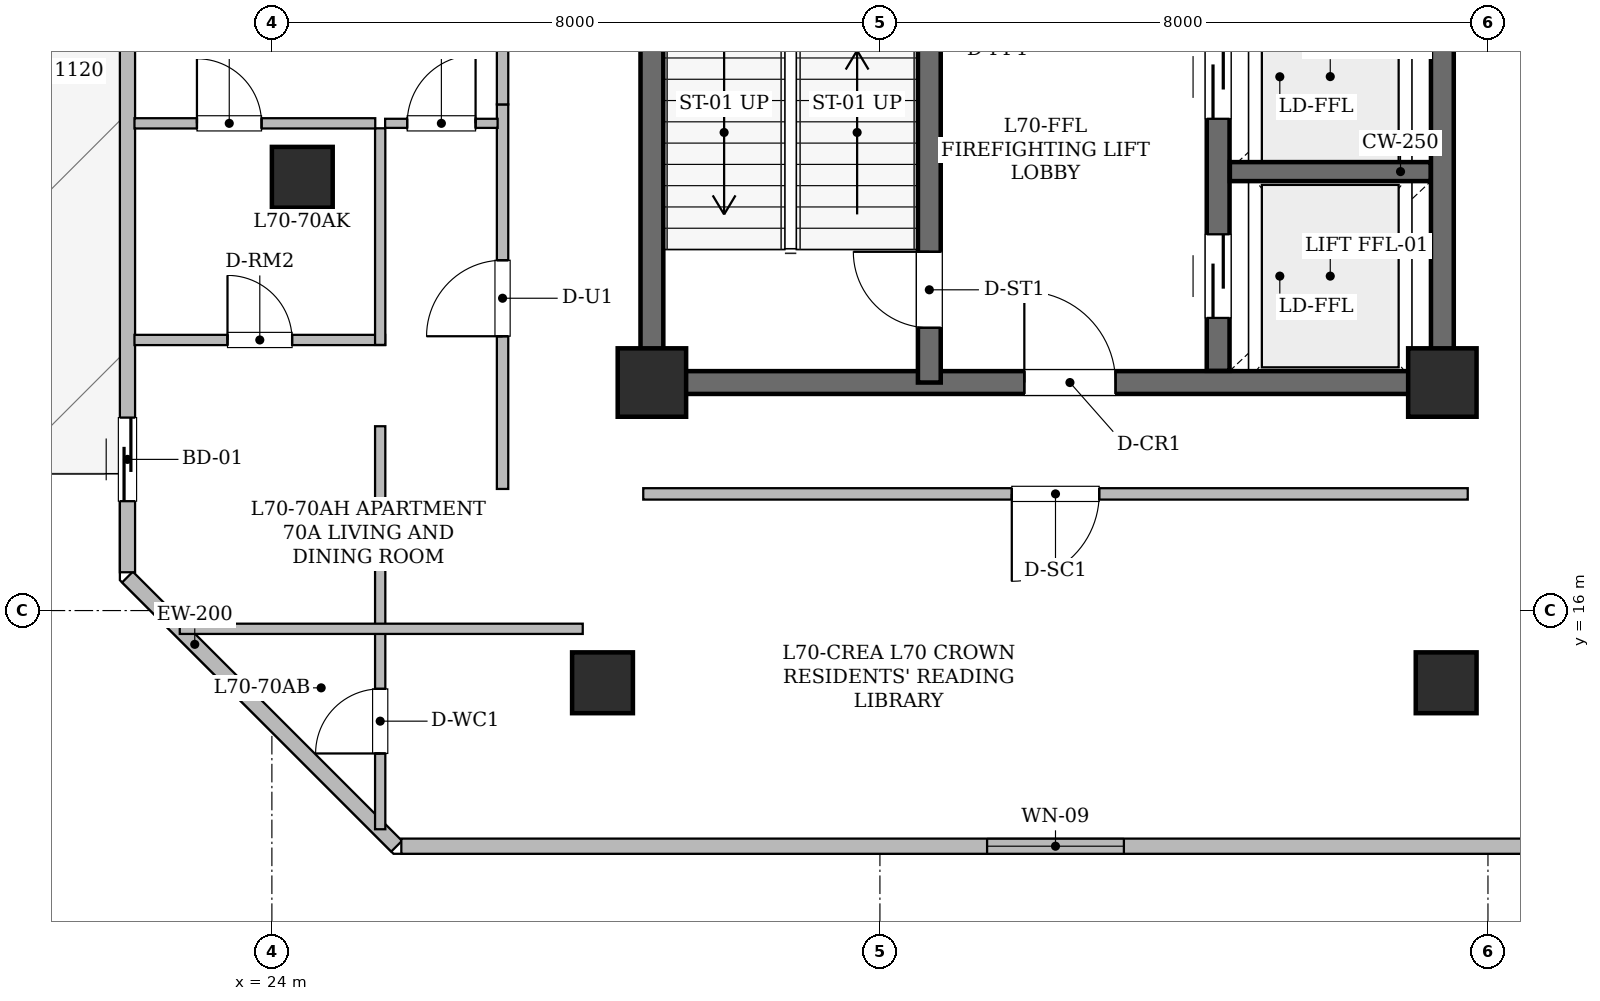
"""IFC4 building model, lengths in metres.
Left out: names, types, materials, properties, quantities, classifications, styles, units other than length and angle.
Written with IfcOpenShell. Run it as: python <this file> out.ifc"""

import sys

from ifc_helpers import new_model, si_unit, direction, frame, frame_2d, origin, origin_2d, place, context, subcontext, project, spatial, rectangle, hollow_rectangle, extrude, element, fill, save


model = new_model("IFC4")
c1 = context("Model", 3, precision=1e-05, world=origin(), true_north=direction((0.0, 1.0)))
c2 = subcontext(c1, "Body", "Model", "MODEL_VIEW")
j1 = project(units=[si_unit("LENGTHUNIT", "METRE"), si_unit("PLANEANGLEUNIT", "RADIAN")], contexts=[c1])
p1 = place(None, origin())
s1 = spatial("IfcSite", under=j1, at=p1, CompositionType="ELEMENT")
p2 = place(p1, origin())
s2 = spatial("IfcBuilding", under=s1, at=p2, CompositionType="ELEMENT")
p3 = place(p2, frame((0.0, 0.0, 273.65)))
s3 = spatial("IfcBuildingStorey", under=s2, at=p3, CompositionType="ELEMENT", Elevation=273.65)
for number, where, z_axis, x_axis in (
    (1, (29.0, 19.0, 0.0), (0.0, 0.0, 1.0), (1.0, 0.0, 0.0)),
    (2, (39.4, 19.0, 0.0), (0.0, 0.0, 1.0), (1.0, 0.0, 0.0)),
):
    element("IfcColumn", number, at=place(p3, frame(where, z_axis=z_axis, x_axis=x_axis)), inside=s3, PredefinedType="COLUMN", context=c2, shape_type="SweptSolid", body=[
        extrude(hollow_rectangle(XDim=0.9, YDim=0.9, WallThickness=0.045, at=origin_2d()), origin(), (0.0, 0.0, 1.0), 4.2),
    ])
for number, where, z_axis, x_axis in (
    (3, (28.35, 15.05, 0.0), (0.0, 0.0, 1.0), (1.0, 0.0, 0.0)),
    (4, (39.45, 15.05, 0.0), (0.0, 0.0, 1.0), (1.0, 0.0, 0.0)),
    (5, (24.4, 21.7, 0.0), (0.0, 0.0, 1.0), (1.0, 0.0, 0.0)),
):
    element("IfcColumn", number, at=place(p3, frame(where, z_axis=z_axis, x_axis=x_axis)), inside=s3, PredefinedType="COLUMN", context=c2, shape_type="SweptSolid", body=[
        extrude(hollow_rectangle(XDim=0.8, YDim=0.8, WallThickness=0.04, at=origin_2d()), origin(), (0.0, 0.0, 1.0), 4.175),
    ])
p4 = place(p3, frame((25.641, 12.9, 0.0), z_axis=(0.0, 0.0, 1.0), x_axis=(-0.707106781187, 0.707106781187, 0.0)))
e6 = element("IfcWall", 6, at=p4, inside=s3, PredefinedType="STANDARD", context=c2, shape_type="SweptSolid", body=[
    extrude(rectangle(XDim=5.008, YDim=0.2, at=frame_2d((2.504, 0.0))), origin(), (0.0, 0.0, 1.0), 3.78),
])
p5 = place(p3, frame((22.1, 16.504, 0.0), z_axis=(0.0, 0.0, 1.0), x_axis=(0.0, 1.0, 0.0)))
e7 = element("IfcWall", 7, at=p5, inside=s3, PredefinedType="STANDARD", context=c2, shape_type="SweptSolid", body=[
    extrude(rectangle(XDim=8.664, YDim=0.2, at=frame_2d((4.332, 0.0))), origin(), (0.0, 0.0, 1.0), 3.78),
])
p6 = place(p5, frame((0.935, 0.0, 0.0)))
e8 = element("IfcOpeningElement", 8, at=p6, cuts=e7, PredefinedType="OPENING", context=c2, shape_type="SweptSolid", body=[
    extrude(rectangle(XDim=1.1, YDim=2.2, at=frame_2d((0.55, 1.1))), frame((0.0, 0.11, 0.0), z_axis=(0.0, -1.0, 0.0), x_axis=(1.0, 0.0, 0.0)), (0.0, 0.0, 1.0), 0.22),
])
p7 = place(p3, frame((64.296, 12.9, 0.0), z_axis=(0.0, 0.0, 1.0), x_axis=(-1.0, 0.0, 0.0)))
e9 = element("IfcWall", 9, at=p7, inside=s3, PredefinedType="STANDARD", context=c2, shape_type="SweptSolid", body=[
    extrude(rectangle(XDim=38.593, YDim=0.2, at=frame_2d((19.296, 0.0))), origin(), (0.0, 0.0, 1.0), 3.78),
])
p8 = place(p7, frame((29.086, 0.0, 0.85)))
e10 = element("IfcOpeningElement", 10, at=p8, cuts=e9, PredefinedType="OPENING", context=c2, shape_type="SweptSolid", body=[
    extrude(rectangle(XDim=1.8, YDim=0.92, at=frame_2d((0.9, 0.46))), frame((0.0, 0.11, 0.0), z_axis=(0.0, -1.0, 0.0), x_axis=(1.0, 0.0, 0.0)), (0.0, 0.0, 1.0), 0.22),
])
p9 = place(p7, frame((18.761, 0.0, 0.78)))
e11 = element("IfcOpeningElement", 11, at=p9, cuts=e9, PredefinedType="OPENING", context=c2, shape_type="SweptSolid", body=[
    extrude(rectangle(XDim=1.2, YDim=1.5, at=frame_2d((0.6, 0.75))), frame((0.0, 0.11, 0.0), z_axis=(0.0, -1.0, 0.0), x_axis=(1.0, 0.0, 0.0)), (0.0, 0.0, 1.0), 0.22),
])
p10 = place(p7, frame((15.286, 0.0, 0.85)))
e12 = element("IfcOpeningElement", 12, at=p10, cuts=e9, PredefinedType="OPENING", context=c2, shape_type="SweptSolid", body=[
    extrude(rectangle(XDim=1.8, YDim=0.92, at=frame_2d((0.9, 0.46))), frame((0.0, 0.11, 0.0), z_axis=(0.0, -1.0, 0.0), x_axis=(1.0, 0.0, 0.0)), (0.0, 0.0, 1.0), 0.22),
])
p11 = place(p7, frame((8.921, 0.0, 0.85)))
e13 = element("IfcOpeningElement", 13, at=p11, cuts=e9, PredefinedType="OPENING", context=c2, shape_type="SweptSolid", body=[
    extrude(rectangle(XDim=1.8, YDim=0.92, at=frame_2d((0.9, 0.46))), frame((0.0, 0.11, 0.0), z_axis=(0.0, -1.0, 0.0), x_axis=(1.0, 0.0, 0.0)), (0.0, 0.0, 1.0), 0.22),
])
p12 = place(p7, frame((1.633, 0.0, 0.85)))
e14 = element("IfcOpeningElement", 14, at=p12, cuts=e9, PredefinedType="OPENING", context=c2, shape_type="SweptSolid", body=[
    extrude(rectangle(XDim=1.8, YDim=0.92, at=frame_2d((0.9, 0.46))), frame((0.0, 0.11, 0.0), z_axis=(0.0, -1.0, 0.0), x_axis=(1.0, 0.0, 0.0)), (0.0, 0.0, 1.0), 0.22),
])
p13 = place(p3, frame((29.0, 19.0, 0.0), z_axis=(0.0, 0.0, 1.0), x_axis=(0.0, 1.0, 0.0)))
e15 = element("IfcWall", 15, at=p13, inside=s3, PredefinedType="SHEAR", context=c2, shape_type="SweptSolid", body=[
    extrude(rectangle(XDim=9.0, YDim=0.3, at=frame_2d((4.5, 0.0))), origin(), (0.0, 0.0, 1.0), 3.78),
])
p14 = place(p3, frame((29.0, 19.0, 0.0), z_axis=(0.0, 0.0, 1.0), x_axis=(1.0, 0.0, 0.0)))
e16 = element("IfcWall", 16, at=p14, inside=s3, PredefinedType="SHEAR", context=c2, shape_type="SweptSolid", body=[
    extrude(rectangle(XDim=10.4, YDim=0.3, at=frame_2d((5.2, 0.0))), origin(), (0.0, 0.0, 1.0), 3.78),
])
p15 = place(p14, frame((4.9, 0.0, 0.0)))
e17 = element("IfcOpeningElement", 17, at=p15, cuts=e16, PredefinedType="OPENING", context=c2, shape_type="SweptSolid", body=[
    extrude(rectangle(XDim=1.2, YDim=2.15, at=frame_2d((0.6, 1.075))), frame((0.0, 0.16, 0.0), z_axis=(0.0, -1.0, 0.0), x_axis=(1.0, 0.0, 0.0)), (0.0, 0.0, 1.0), 0.32),
])
p16 = place(p3, frame((39.4, 19.0, 0.0), z_axis=(0.0, 0.0, 1.0), x_axis=(0.0, 1.0, 0.0)))
e18 = element("IfcWall", 18, at=p16, inside=s3, PredefinedType="SHEAR", context=c2, shape_type="SweptSolid", body=[
    extrude(rectangle(XDim=5.4, YDim=0.3, at=frame_2d((2.7, 0.0))), origin(), (0.0, 0.0, 1.0), 3.78),
])
p17 = place(p3, frame((32.65, 19.0, 0.0), z_axis=(0.0, 0.0, 1.0), x_axis=(0.0, 1.0, 0.0)))
e19 = element("IfcWall", 19, at=p17, inside=s3, PredefinedType="SHEAR", context=c2, shape_type="SweptSolid", body=[
    extrude(rectangle(XDim=9.0, YDim=0.3, at=frame_2d((4.5, 0.0))), origin(), (0.0, 0.0, 1.0), 3.78),
])
p18 = place(p17, frame((0.72, 0.0, 0.0)))
e20 = element("IfcOpeningElement", 20, at=p18, cuts=e19, PredefinedType="OPENING", context=c2, shape_type="SweptSolid", body=[
    extrude(rectangle(XDim=1.0, YDim=2.15, at=frame_2d((0.5, 1.075))), frame((0.0, 0.16, 0.0), z_axis=(0.0, -1.0, 0.0), x_axis=(1.0, 0.0, 0.0)), (0.0, 0.0, 1.0), 0.32),
])
p19 = place(p3, frame((36.45, 19.154, 0.0), z_axis=(0.0, 0.0, 1.0), x_axis=(0.0, 1.0, 0.0)))
e21 = element("IfcWall", 21, at=p19, inside=s3, PredefinedType="SHEAR", context=c2, shape_type="SweptSolid", body=[
    extrude(rectangle(XDim=4.796, YDim=0.3, at=frame_2d((2.398, 0.0))), origin(), (0.0, 0.0, 1.0), 3.78),
])
p20 = place(p19, frame((0.696, 0.0, 0.0)))
e22 = element("IfcOpeningElement", 22, at=p20, cuts=e21, PredefinedType="OPENING", context=c2, shape_type="SweptSolid", body=[
    extrude(rectangle(XDim=1.1, YDim=2.15, at=frame_2d((0.55, 1.075))), frame((0.0, 0.16, 0.0), z_axis=(0.0, -1.0, 0.0), x_axis=(1.0, 0.0, 0.0)), (0.0, 0.0, 1.0), 0.32),
])
p21 = place(p19, frame((3.316, 0.0, 0.0)))
e23 = element("IfcOpeningElement", 23, at=p21, cuts=e21, PredefinedType="OPENING", context=c2, shape_type="SweptSolid", body=[
    extrude(rectangle(XDim=1.1, YDim=2.15, at=frame_2d((0.55, 1.075))), frame((0.0, 0.16, 0.0), z_axis=(0.0, -1.0, 0.0), x_axis=(1.0, 0.0, 0.0)), (0.0, 0.0, 1.0), 0.32),
])
p22 = place(p3, frame((36.604, 21.775, 0.0), z_axis=(0.0, 0.0, 1.0), x_axis=(1.0, 0.0, 0.0)))
e24 = element("IfcWall", 24, at=p22, inside=s3, PredefinedType="SHEAR", context=c2, shape_type="SweptSolid", body=[
    extrude(rectangle(XDim=2.642, YDim=0.25, at=frame_2d((1.321, 0.0))), origin(), (0.0, 0.0, 1.0), 3.78),
])
p23 = place(p3, frame((39.734, 17.535, 0.0), z_axis=(0.0, 0.0, 1.0), x_axis=(-1.0, 0.0, 0.0)))
e25 = element("IfcWall", 25, at=p23, inside=s3, PredefinedType="STANDARD", context=c2, shape_type="SweptSolid", body=[
    extrude(rectangle(XDim=10.848, YDim=0.15, at=frame_2d((5.424, 0.0))), origin(), (0.0, 0.0, 1.0), 2.837),
])
p24 = place(p23, frame((4.849, 0.0, 0.0)))
e26 = element("IfcOpeningElement", 26, at=p24, cuts=e25, PredefinedType="OPENING", context=c2, shape_type="SweptSolid", body=[
    extrude(rectangle(XDim=1.15, YDim=2.2, at=frame_2d((0.575, 1.1))), frame((0.0, 0.085, 0.0), z_axis=(0.0, -1.0, 0.0), x_axis=(1.0, 0.0, 0.0)), (0.0, 0.0, 1.0), 0.17),
])
p25 = place(p3, frame((27.035, 17.6, 0.0), z_axis=(0.0, 0.0, 1.0), x_axis=(0.0, 1.0, 0.0)))
e27 = element("IfcWall", 27, at=p25, inside=s3, PredefinedType="STANDARD", context=c2, shape_type="SweptSolid", body=[
    extrude(rectangle(XDim=5.059, YDim=0.15, at=frame_2d((2.529, 0.0))), origin(), (0.0, 0.0, 1.0), 2.22),
])
p26 = place(p25, frame((2.009, 0.0, 0.0)))
e28 = element("IfcOpeningElement", 28, at=p26, cuts=e27, PredefinedType="OPENING", context=c2, shape_type="SweptSolid", body=[
    extrude(rectangle(XDim=1.0, YDim=2.15, at=frame_2d((0.5, 1.075))), frame((0.0, 0.085, 0.0), z_axis=(0.0, -1.0, 0.0), x_axis=(1.0, 0.0, 0.0)), (0.0, 0.0, 1.0), 0.17),
])
p27 = place(p3, frame((27.035, 22.659, 0.0), z_axis=(0.0, 0.0, 1.0), x_axis=(0.0, 1.0, 0.0)))
e29 = element("IfcWall", 29, at=p27, inside=s3, PredefinedType="STANDARD", context=c2, shape_type="SweptSolid", body=[
    extrude(rectangle(XDim=15.741, YDim=0.15, at=frame_2d((7.871, 0.0))), origin(), (0.0, 0.0, 1.0), 2.22),
])
p28 = place(p27, frame((7.37, 0.0, 0.0)))
e30 = element("IfcOpeningElement", 30, at=p28, cuts=e29, PredefinedType="OPENING", context=c2, shape_type="SweptSolid", body=[
    extrude(rectangle(XDim=1.0, YDim=2.15, at=frame_2d((0.5, 1.075))), frame((0.0, 0.085, 0.0), z_axis=(0.0, -1.0, 0.0), x_axis=(1.0, 0.0, 0.0)), (0.0, 0.0, 1.0), 0.17),
])
p29 = place(p3, frame((25.425, 13.123, 0.0), z_axis=(0.0, 0.0, 1.0), x_axis=(0.0, 1.0, 0.0)))
e31 = element("IfcWall", 31, at=p29, inside=s3, PredefinedType="PARTITIONING", context=c2, shape_type="SweptSolid", body=[
    extrude(rectangle(XDim=5.302, YDim=0.135, at=frame_2d((2.651, 0.0))), origin(), (0.0, 0.0, 1.0), 3.78),
])
p30 = place(p29, frame((0.997, 0.0, 0.0)))
e32 = element("IfcOpeningElement", 32, at=p30, cuts=e31, PredefinedType="OPENING", context=c2, shape_type="SweptSolid", body=[
    extrude(rectangle(XDim=0.85, YDim=2.1, at=frame_2d((0.425, 1.05))), frame((0.0, 0.077, 0.0), z_axis=(0.0, -1.0, 0.0), x_axis=(1.0, 0.0, 0.0)), (0.0, 0.0, 1.0), 0.155),
])
p31 = place(p3, frame((28.09, 15.76, 0.0), z_axis=(0.0, 0.0, 1.0), x_axis=(-1.0, 0.0, 0.0)))
e33 = element("IfcWall", 33, at=p31, inside=s3, PredefinedType="PARTITIONING", context=c2, shape_type="SweptSolid", body=[
    extrude(rectangle(XDim=5.302, YDim=0.135, at=frame_2d((2.651, 0.0))), origin(), (0.0, 0.0, 1.0), 2.22),
])
p32 = place(p3, frame((22.192, 19.56, 0.0), z_axis=(0.0, 0.0, 1.0), x_axis=(1.0, 0.0, 0.0)))
e34 = element("IfcWall", 34, at=p32, inside=s3, PredefinedType="PARTITIONING", context=c2, shape_type="SweptSolid", body=[
    extrude(rectangle(XDim=3.298, YDim=0.135, at=frame_2d((1.649, 0.0))), origin(), (0.0, 0.0, 1.0), 2.22),
])
p33 = place(p32, frame((1.224, 0.0, 0.0)))
e35 = element("IfcOpeningElement", 35, at=p33, cuts=e34, PredefinedType="OPENING", context=c2, shape_type="SweptSolid", body=[
    extrude(rectangle(XDim=0.85, YDim=2.1, at=frame_2d((0.425, 1.05))), frame((0.0, 0.077, 0.0), z_axis=(0.0, -1.0, 0.0), x_axis=(1.0, 0.0, 0.0)), (0.0, 0.0, 1.0), 0.155),
])
p34 = place(p3, frame((25.425, 19.495, 0.0), z_axis=(0.0, 0.0, 1.0), x_axis=(0.0, 1.0, 0.0)))
e36 = element("IfcWall", 36, at=p34, inside=s3, PredefinedType="PARTITIONING", context=c2, shape_type="SweptSolid", body=[
    extrude(rectangle(XDim=2.85, YDim=0.135, at=frame_2d((1.425, 0.0))), origin(), (0.0, 0.0, 1.0), 2.22),
])
p35 = place(p3, frame((25.49, 22.41, 0.0), z_axis=(0.0, 0.0, 1.0), x_axis=(1.0, 0.0, 0.0)))
e37 = element("IfcWall", 37, at=p35, inside=s3, PredefinedType="PARTITIONING", context=c2, shape_type="SweptSolid", body=[
    extrude(rectangle(XDim=1.48, YDim=0.12, at=frame_2d((0.74, 0.0))), origin(), (0.0, 0.0, 1.0), 2.67),
])
p36 = place(p35, frame((0.29, 0.0, 0.0)))
e38 = element("IfcOpeningElement", 38, at=p36, cuts=e37, PredefinedType="OPENING", context=c2, shape_type="SweptSolid", body=[
    extrude(rectangle(XDim=0.9, YDim=2.1, at=frame_2d((0.45, 1.05))), frame((0.0, 0.07, 0.0), z_axis=(0.0, -1.0, 0.0), x_axis=(1.0, 0.0, 0.0)), (0.0, 0.0, 1.0), 0.14),
])
p37 = place(p3, frame((22.192, 22.41, 0.0), z_axis=(0.0, 0.0, 1.0), x_axis=(1.0, 0.0, 0.0)))
e39 = element("IfcWall", 39, at=p37, inside=s3, PredefinedType="PARTITIONING", context=c2, shape_type="SweptSolid", body=[
    extrude(rectangle(XDim=3.168, YDim=0.135, at=frame_2d((1.584, 0.0))), origin(), (0.0, 0.0, 1.0), 2.22),
])
p38 = place(p37, frame((0.822, 0.0, 0.0)))
e40 = element("IfcOpeningElement", 40, at=p38, cuts=e39, PredefinedType="OPENING", context=c2, shape_type="SweptSolid", body=[
    extrude(rectangle(XDim=0.85, YDim=2.1, at=frame_2d((0.425, 1.05))), frame((0.0, 0.077, 0.0), z_axis=(0.0, -1.0, 0.0), x_axis=(1.0, 0.0, 0.0)), (0.0, 0.0, 1.0), 0.155),
])
p39 = place(p6, origin())
e41 = element("IfcDoor", 41, at=p39, inside=s3, OperationType="SLIDING_TO_LEFT", PredefinedType="DOOR", context=c2, shape_type="SweptSolid", body=[
    extrude(rectangle(XDim=1.1, YDim=2.2, at=frame_2d((0.55, 1.1))), frame((0.0, 0.025, 0.0), z_axis=(0.0, -1.0, 0.0), x_axis=(1.0, 0.0, 0.0)), (0.0, 0.0, 1.0), 0.05),
])
fill(e8, e41)
p40 = place(p8, origin())
e42 = element("IfcWindow", 42, at=p40, inside=s3, PartitioningType="SINGLE_PANEL", PredefinedType="WINDOW", context=c2, shape_type="SweptSolid", body=[
    extrude(rectangle(XDim=1.8, YDim=0.92, at=frame_2d((0.9, 0.46))), frame((0.0, 0.03, 0.0), z_axis=(0.0, -1.0, 0.0), x_axis=(1.0, 0.0, 0.0)), (0.0, 0.0, 1.0), 0.06),
])
fill(e10, e42)
p41 = place(p18, origin())
e43 = element("IfcDoor", 43, at=p41, inside=s3, OperationType="SINGLE_SWING_RIGHT", PredefinedType="DOOR", context=c2, shape_type="SweptSolid", body=[
    extrude(rectangle(XDim=1.0, YDim=2.15, at=frame_2d((0.5, 1.075))), frame((0.0, 0.025, 0.0), z_axis=(0.0, -1.0, 0.0), x_axis=(1.0, 0.0, 0.0)), (0.0, 0.0, 1.0), 0.05),
])
fill(e20, e43)
p42 = place(p15, origin())
e44 = element("IfcDoor", 44, at=p42, inside=s3, OperationType="SINGLE_SWING_LEFT", PredefinedType="DOOR", context=c2, shape_type="SweptSolid", body=[
    extrude(rectangle(XDim=1.2, YDim=2.15, at=frame_2d((0.6, 1.075))), frame((0.0, 0.025, 0.0), z_axis=(0.0, -1.0, 0.0), x_axis=(1.0, 0.0, 0.0)), (0.0, 0.0, 1.0), 0.05),
])
fill(e17, e44)
p43 = place(p20, origin())
e45 = element("IfcDoor", 45, at=p43, inside=s3, OperationType="SLIDING_TO_LEFT", PredefinedType="DOOR", context=c2, shape_type="SweptSolid", body=[
    extrude(rectangle(XDim=1.1, YDim=2.15, at=frame_2d((0.55, 1.075))), frame((0.0, 0.025, 0.0), z_axis=(0.0, -1.0, 0.0), x_axis=(1.0, 0.0, 0.0)), (0.0, 0.0, 1.0), 0.05),
])
fill(e22, e45)
p44 = place(p21, origin())
e46 = element("IfcDoor", 46, at=p44, inside=s3, OperationType="SLIDING_TO_LEFT", PredefinedType="DOOR", context=c2, shape_type="SweptSolid", body=[
    extrude(rectangle(XDim=1.1, YDim=2.15, at=frame_2d((0.55, 1.075))), frame((0.0, 0.025, 0.0), z_axis=(0.0, -1.0, 0.0), x_axis=(1.0, 0.0, 0.0)), (0.0, 0.0, 1.0), 0.05),
])
fill(e23, e46)
p45 = place(p24, origin())
e47 = element("IfcDoor", 47, at=p45, inside=s3, OperationType="SINGLE_SWING_RIGHT", PredefinedType="DOOR", context=c2, shape_type="SweptSolid", body=[
    extrude(rectangle(XDim=1.15, YDim=2.2, at=frame_2d((0.575, 1.1))), frame((0.0, 0.025, 0.0), z_axis=(0.0, -1.0, 0.0), x_axis=(1.0, 0.0, 0.0)), (0.0, 0.0, 1.0), 0.05),
])
fill(e26, e47)
p46 = place(p26, origin())
e48 = element("IfcDoor", 48, at=p46, inside=s3, OperationType="SINGLE_SWING_LEFT", PredefinedType="DOOR", context=c2, shape_type="SweptSolid", body=[
    extrude(rectangle(XDim=1.0, YDim=2.15, at=frame_2d((0.5, 1.075))), frame((0.0, 0.025, 0.0), z_axis=(0.0, -1.0, 0.0), x_axis=(1.0, 0.0, 0.0)), (0.0, 0.0, 1.0), 0.05),
])
fill(e28, e48)
p47 = place(p30, origin())
e49 = element("IfcDoor", 49, at=p47, inside=s3, OperationType="SINGLE_SWING_LEFT", PredefinedType="DOOR", context=c2, shape_type="SweptSolid", body=[
    extrude(rectangle(XDim=0.85, YDim=2.1, at=frame_2d((0.425, 1.05))), frame((0.0, 0.025, 0.0), z_axis=(0.0, -1.0, 0.0), x_axis=(1.0, 0.0, 0.0)), (0.0, 0.0, 1.0), 0.05),
])
fill(e32, e49)
p48 = place(p33, origin())
e50 = element("IfcDoor", 50, at=p48, inside=s3, OperationType="SINGLE_SWING_LEFT", PredefinedType="DOOR", context=c2, shape_type="SweptSolid", body=[
    extrude(rectangle(XDim=0.85, YDim=2.1, at=frame_2d((0.425, 1.05))), frame((0.0, 0.025, 0.0), z_axis=(0.0, -1.0, 0.0), x_axis=(1.0, 0.0, 0.0)), (0.0, 0.0, 1.0), 0.05),
])
fill(e35, e50)
p49 = place(p36, origin())
e51 = element("IfcDoor", 51, at=p49, inside=s3, OperationType="SINGLE_SWING_RIGHT", PredefinedType="DOOR", context=c2, shape_type="SweptSolid", body=[
    extrude(rectangle(XDim=0.9, YDim=2.1, at=frame_2d((0.45, 1.05))), frame((0.0, 0.025, 0.0), z_axis=(0.0, -1.0, 0.0), x_axis=(1.0, 0.0, 0.0)), (0.0, 0.0, 1.0), 0.05),
])
fill(e38, e51)
p50 = place(p38, origin())
e52 = element("IfcDoor", 52, at=p50, inside=s3, OperationType="SINGLE_SWING_LEFT", PredefinedType="DOOR", context=c2, shape_type="SweptSolid", body=[
    extrude(rectangle(XDim=0.85, YDim=2.1, at=frame_2d((0.425, 1.05))), frame((0.0, 0.025, 0.0), z_axis=(0.0, -1.0, 0.0), x_axis=(1.0, 0.0, 0.0)), (0.0, 0.0, 1.0), 0.05),
])
fill(e40, e52)
save(model, sys.argv[1])
